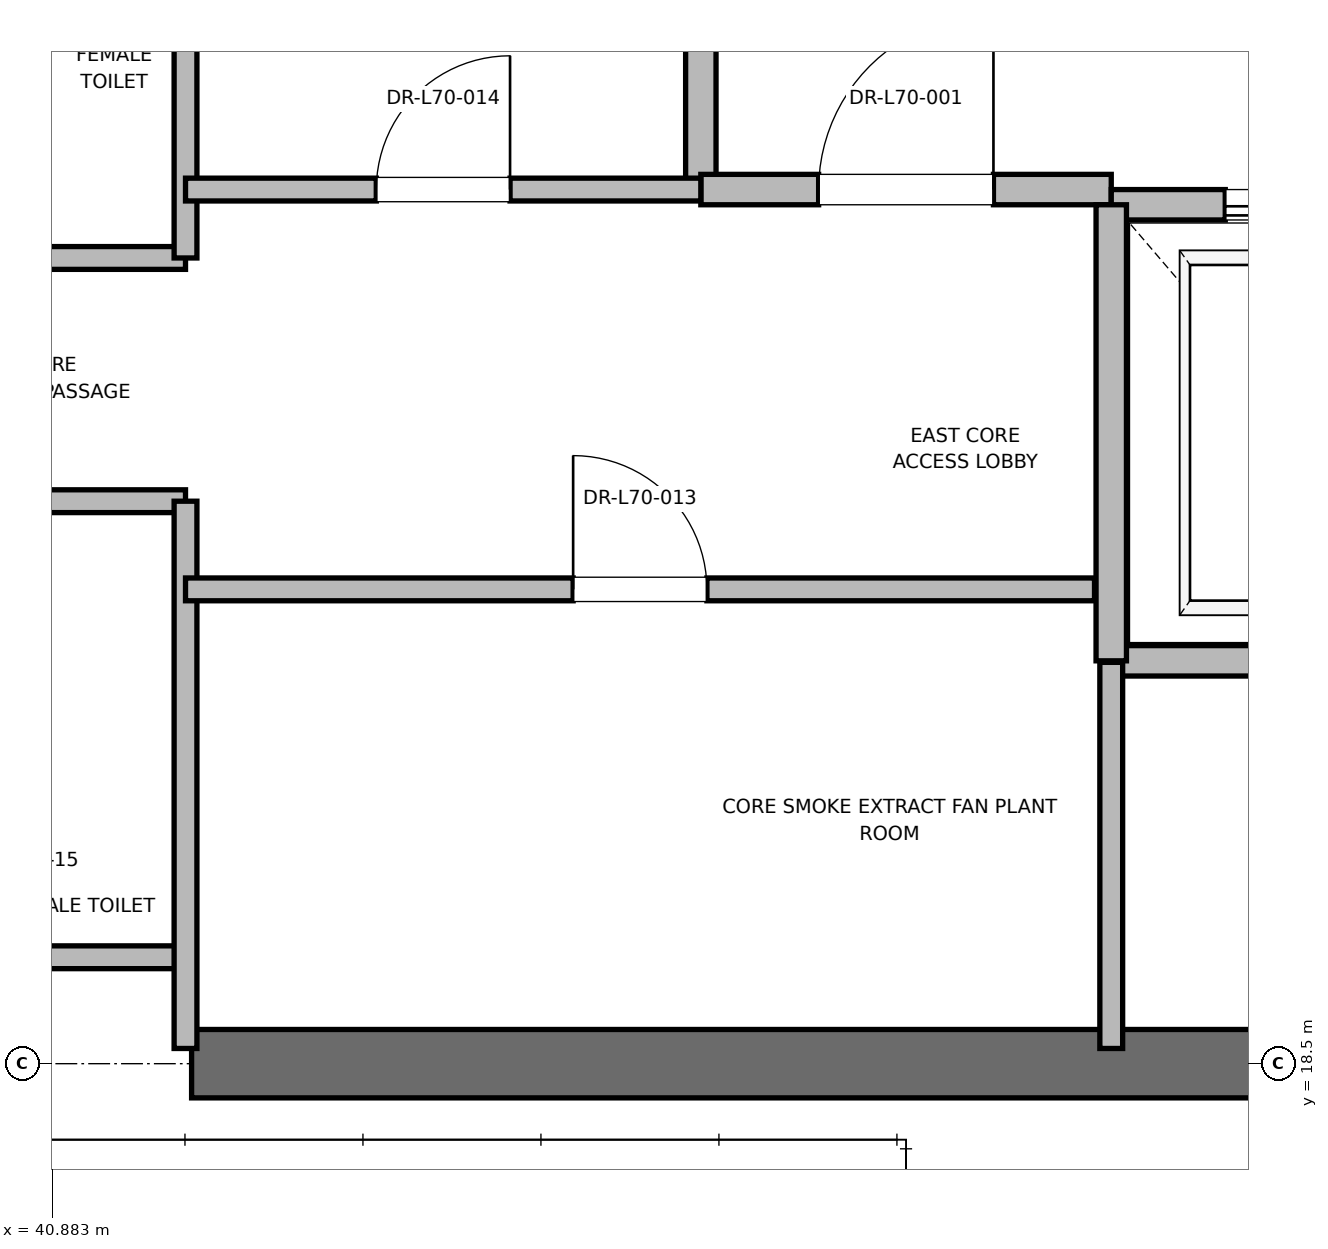
"""IFC4 building model, lengths in metres.
Left out: names, types, materials, properties, quantities, classifications, styles, units other than length and angle.
Written with IfcOpenShell. Run it as: python <this file> out.ifc"""

import sys

from ifc_helpers import new_model, si_unit, direction, frame, frame_2d, origin, place, context, subcontext, project, spatial, rectangle, extrude, element, fill, save


model = new_model("IFC4")
c1 = context("Model", 3, precision=1e-05, world=origin(), true_north=direction((0.0, 1.0)))
c2 = subcontext(c1, "Body", "Model", "MODEL_VIEW")
j1 = project(units=[si_unit("LENGTHUNIT", "METRE"), si_unit("PLANEANGLEUNIT", "RADIAN")], contexts=[c1])
p1 = place(None, origin())
s1 = spatial("IfcSite", under=j1, at=p1, CompositionType="ELEMENT")
p2 = place(p1, origin())
s2 = spatial("IfcBuilding", under=s1, at=p2, CompositionType="ELEMENT")
p3 = place(p2, frame((0.0, 0.0, 301.0)))
s3 = spatial("IfcBuildingStorey", under=s2, at=p3, CompositionType="ELEMENT", Elevation=301.0)
p4 = place(p3, frame((41.8, 18.5, 0.0), z_axis=(0.0, 0.0, 1.0), x_axis=(1.0, 0.0, 0.0)))
e1 = element("IfcWall", 1, at=p4, inside=s3, PredefinedType="SHEAR", context=c2, shape_type="SweptSolid", body=[
    extrude(rectangle(XDim=9.2, YDim=0.45, at=frame_2d((4.6, 0.0))), origin(), (0.0, 0.0, 1.0), 5.585),
])
p5 = place(p3, frame((45.15, 24.25, 0.0), z_axis=(0.0, 0.0, 1.0), x_axis=(0.0, 1.0, 0.0)))
e2 = element("IfcWall", 2, at=p5, inside=s3, PredefinedType="PARTITIONING", context=c2, shape_type="SweptSolid", body=[
    extrude(rectangle(XDim=3.37, YDim=0.2, at=frame_2d((1.685, 0.0))), origin(), (0.0, 0.0, 1.0), 5.585),
])
p6 = place(p3, frame((45.15, 24.25, 0.0), z_axis=(0.0, 0.0, 1.0), x_axis=(1.0, 0.0, 0.0)))
e3 = element("IfcWall", 3, at=p6, inside=s3, PredefinedType="PARTITIONING", context=c2, shape_type="SweptSolid", body=[
    extrude(rectangle(XDim=2.7, YDim=0.2, at=frame_2d((1.35, 0.0))), origin(), (0.0, 0.0, 1.0), 5.585),
])
p7 = place(p6, frame((0.775, 0.0, 0.0)))
e4 = element("IfcOpeningElement", 4, at=p7, cuts=e3, PredefinedType="OPENING", context=c2, shape_type="SweptSolid", body=[
    extrude(rectangle(XDim=1.15, YDim=2.2, at=frame_2d((0.575, 1.1))), frame((0.0, 0.1, 0.0), z_axis=(0.0, -1.0, 0.0), x_axis=(1.0, 0.0, 0.0)), (0.0, 0.0, 1.0), 0.2),
])
p8 = place(p3, frame((47.85, 21.15, 0.0), z_axis=(0.0, 0.0, 1.0), x_axis=(1.0, 0.0, 0.0)))
e5 = element("IfcWall", 5, at=p8, inside=s3, PredefinedType="SOLIDWALL", context=c2, shape_type="SweptSolid", body=[
    extrude(rectangle(XDim=2.6, YDim=0.2, at=frame_2d((1.3, 0.0))), origin(), (0.0, 0.0, 1.0), 5.585),
])
p9 = place(p3, frame((50.45, 24.15, 0.0), z_axis=(0.0, 0.0, 1.0), x_axis=(-1.0, 0.0, 0.0)))
e6 = element("IfcWall", 6, at=p9, inside=s3, PredefinedType="SOLIDWALL", context=c2, shape_type="SweptSolid", body=[
    extrude(rectangle(XDim=2.6, YDim=0.2, at=frame_2d((1.3, 0.0))), origin(), (0.0, 0.0, 1.0), 4.665),
])
p10 = place(p9, frame((0.75, 0.0, 0.0)))
e7 = element("IfcOpeningElement", 7, at=p10, cuts=e6, PredefinedType="OPENING", context=c2, shape_type="SweptSolid", body=[
    extrude(rectangle(XDim=1.1, YDim=2.2, at=frame_2d((0.55, 1.1))), frame((0.0, 0.1, 0.0), z_axis=(0.0, -1.0, 0.0), x_axis=(1.0, 0.0, 0.0)), (0.0, 0.0, 1.0), 0.2),
])
p11 = place(p3, frame((47.85, 24.15, 0.0), z_axis=(0.0, 0.0, 1.0), x_axis=(0.0, -1.0, 0.0)))
e8 = element("IfcWall", 8, at=p11, inside=s3, PredefinedType="SOLIDWALL", context=c2, shape_type="SweptSolid", body=[
    extrude(rectangle(XDim=3.0, YDim=0.2, at=frame_2d((1.5, 0.0))), origin(), (0.0, 0.0, 1.0), 5.585),
])
for number, where, z_axis, x_axis in (
    (9, (39.95, 19.2, 0.0), (0.0, 0.0, 1.0), (1.0, 0.0, 0.0)),
    (10, (39.95, 22.2, 0.0), (0.0, 0.0, 1.0), (1.0, 0.0, 0.0)),
    (11, (39.95, 23.8, 0.0), (0.0, 0.0, 1.0), (1.0, 0.0, 0.0)),
):
    element("IfcWall", number, at=place(p3, frame(where, z_axis=z_axis, x_axis=x_axis)), inside=s3, PredefinedType="PARTITIONING", context=c2, shape_type="SweptSolid", body=[
        extrude(rectangle(XDim=1.81, YDim=0.15, at=frame_2d((0.905, 0.0))), origin(), (0.0, 0.0, 1.0), 2.85),
    ])
p12 = place(p3, frame((41.76, 18.6, 0.0), z_axis=(0.0, 0.0, 1.0), x_axis=(0.0, 1.0, 0.0)))
e12 = element("IfcWall", 12, at=p12, inside=s3, PredefinedType="PARTITIONING", context=c2, shape_type="SweptSolid", body=[
    extrude(rectangle(XDim=3.6, YDim=0.15, at=frame_2d((1.8, 0.0))), origin(), (0.0, 0.0, 1.0), 2.85),
])
p13 = place(p3, frame((41.76, 23.8, 0.0), z_axis=(0.0, 0.0, 1.0), x_axis=(0.0, 1.0, 0.0)))
e13 = element("IfcWall", 13, at=p13, inside=s3, PredefinedType="PARTITIONING", context=c2, shape_type="SweptSolid", body=[
    extrude(rectangle(XDim=4.0, YDim=0.15, at=frame_2d((2.0, 0.0))), origin(), (0.0, 0.0, 1.0), 2.85),
])
p14 = place(p3, frame((47.85, 18.6, 0.0), z_axis=(0.0, 0.0, 1.0), x_axis=(0.0, 1.0, 0.0)))
e14 = element("IfcWall", 14, at=p14, inside=s3, PredefinedType="PARTITIONING", context=c2, shape_type="SweptSolid", body=[
    extrude(rectangle(XDim=2.54, YDim=0.15, at=frame_2d((1.27, 0.0))), origin(), (0.0, 0.0, 1.0), 2.85),
])
p15 = place(p3, frame((41.76, 21.62, 0.0), z_axis=(0.0, 0.0, 1.0), x_axis=(1.0, 0.0, 0.0)))
e15 = element("IfcWall", 15, at=p15, inside=s3, PredefinedType="PARTITIONING", context=c2, shape_type="SweptSolid", body=[
    extrude(rectangle(XDim=5.98, YDim=0.15, at=frame_2d((2.99, 0.0))), origin(), (0.0, 0.0, 1.0), 2.85),
])
p16 = place(p15, frame((2.55, 0.0, 0.0)))
e16 = element("IfcOpeningElement", 16, at=p16, cuts=e15, PredefinedType="OPENING", context=c2, shape_type="SweptSolid", body=[
    extrude(rectangle(XDim=0.88, YDim=2.1, at=frame_2d((0.44, 1.05))), frame((0.0, 0.075, 0.0), z_axis=(0.0, -1.0, 0.0), x_axis=(1.0, 0.0, 0.0)), (0.0, 0.0, 1.0), 0.15),
])
p17 = place(p3, frame((41.76, 24.25, 0.0), z_axis=(0.0, 0.0, 1.0), x_axis=(1.0, 0.0, 0.0)))
e17 = element("IfcWall", 17, at=p17, inside=s3, PredefinedType="PARTITIONING", context=c2, shape_type="SweptSolid", body=[
    extrude(rectangle(XDim=3.39, YDim=0.15, at=frame_2d((1.695, 0.0))), origin(), (0.0, 0.0, 1.0), 2.85),
])
p18 = place(p17, frame((1.255, 0.0, 0.0)))
e18 = element("IfcOpeningElement", 18, at=p18, cuts=e17, PredefinedType="OPENING", context=c2, shape_type="SweptSolid", body=[
    extrude(rectangle(XDim=0.88, YDim=2.1, at=frame_2d((0.44, 1.05))), frame((0.0, 0.075, 0.0), z_axis=(0.0, -1.0, 0.0), x_axis=(1.0, 0.0, 0.0)), (0.0, 0.0, 1.0), 0.15),
])
p19 = place(p7, origin())
e19 = element("IfcDoor", 19, at=p19, inside=s3, OperationType="SINGLE_SWING_RIGHT", PredefinedType="DOOR", context=c2, shape_type="SweptSolid", body=[
    extrude(rectangle(XDim=1.15, YDim=2.2, at=frame_2d((0.575, 1.1))), frame((0.0, 0.025, 0.0), z_axis=(0.0, -1.0, 0.0), x_axis=(1.0, 0.0, 0.0)), (0.0, 0.0, 1.0), 0.05),
])
fill(e4, e19)
p20 = place(p10, origin())
e20 = element("IfcDoor", 20, at=p20, inside=s3, OperationType="SLIDING_TO_RIGHT", PredefinedType="DOOR", context=c2, shape_type="SweptSolid", body=[
    extrude(rectangle(XDim=1.1, YDim=2.2, at=frame_2d((0.55, 1.1))), frame((0.0, 0.025, 0.0), z_axis=(0.0, -1.0, 0.0), x_axis=(1.0, 0.0, 0.0)), (0.0, 0.0, 1.0), 0.05),
])
fill(e7, e20)
p21 = place(p16, origin())
e21 = element("IfcDoor", 21, at=p21, inside=s3, OperationType="SINGLE_SWING_LEFT", PredefinedType="DOOR", context=c2, shape_type="SweptSolid", body=[
    extrude(rectangle(XDim=0.88, YDim=2.1, at=frame_2d((0.44, 1.05))), frame((0.0, 0.025, 0.0), z_axis=(0.0, -1.0, 0.0), x_axis=(1.0, 0.0, 0.0)), (0.0, 0.0, 1.0), 0.05),
])
fill(e16, e21)
p22 = place(p18, origin())
e22 = element("IfcDoor", 22, at=p22, inside=s3, OperationType="SINGLE_SWING_RIGHT", PredefinedType="DOOR", context=c2, shape_type="SweptSolid", body=[
    extrude(rectangle(XDim=0.88, YDim=2.1, at=frame_2d((0.44, 1.05))), frame((0.0, 0.025, 0.0), z_axis=(0.0, -1.0, 0.0), x_axis=(1.0, 0.0, 0.0)), (0.0, 0.0, 1.0), 0.05),
])
fill(e18, e22)
save(model, sys.argv[1])
